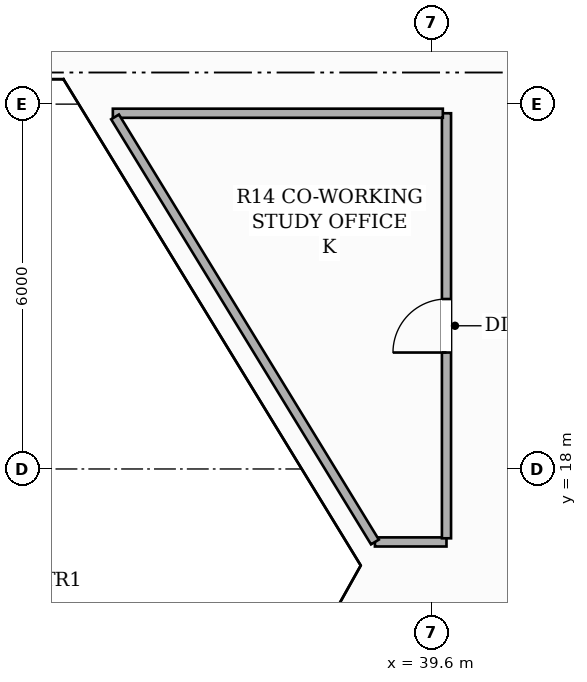
"""IFC4 building model, lengths in metres.
Left out: names, types, materials, properties, quantities, classifications, styles, units other than length and angle.
Written with IfcOpenShell. Run it as: python <this file> out.ifc"""

import sys

from ifc_helpers import new_model, si_unit, direction, frame, frame_2d, origin, place, context, subcontext, project, spatial, rectangle, extrude, element, fill, save


model = new_model("IFC4")
c1 = context("Model", 3, precision=1e-05, world=origin(), true_north=direction((0.0, 1.0)))
c2 = subcontext(c1, "Body", "Model", "MODEL_VIEW")
j1 = project(units=[si_unit("LENGTHUNIT", "METRE"), si_unit("PLANEANGLEUNIT", "RADIAN")], contexts=[c1])
p1 = place(None, origin())
s1 = spatial("IfcSite", under=j1, at=p1, CompositionType="ELEMENT")
p2 = place(p1, origin())
s2 = spatial("IfcBuilding", under=s1, at=p2, CompositionType="ELEMENT")
p3 = place(p2, frame((0.0, 0.0, 64.25)))
s3 = spatial("IfcBuildingStorey", under=s2, at=p3, CompositionType="ELEMENT", Elevation=64.25)
p4 = place(p3, frame((38.673, 16.8, 0.0), z_axis=(0.0, 0.0, 1.0), x_axis=(1.0, 0.0, 0.0)))
e1 = element("IfcWall", 1, at=p4, inside=s3, PredefinedType="PARTITIONING", context=c2, shape_type="SweptSolid", body=[
    extrude(rectangle(XDim=1.177, YDim=0.15, at=frame_2d((0.588, 0.0))), origin(), (0.0, 0.0, 1.0), 3.06),
])
p5 = place(p3, frame((39.85, 16.86, 0.0), z_axis=(0.0, 0.0, 1.0), x_axis=(0.0, 1.0, 0.0)))
e2 = element("IfcWall", 2, at=p5, inside=s3, PredefinedType="PARTITIONING", context=c2, shape_type="SweptSolid", body=[
    extrude(rectangle(XDim=6.99, YDim=0.15, at=frame_2d((3.495, 0.0))), origin(), (0.0, 0.0, 1.0), 2.669),
])
p6 = place(p5, frame((3.055, 0.0, 0.0)))
e3 = element("IfcOpeningElement", 3, at=p6, cuts=e2, PredefinedType="OPENING", context=c2, shape_type="SweptSolid", body=[
    extrude(rectangle(XDim=0.88, YDim=2.1, at=frame_2d((0.44, 1.05))), frame((0.0, 0.085, 0.0), z_axis=(0.0, -1.0, 0.0), x_axis=(1.0, 0.0, 0.0)), (0.0, 0.0, 1.0), 0.17),
])
p7 = place(p3, frame((39.79, 23.85, 0.0), z_axis=(0.0, 0.0, 1.0), x_axis=(-1.0, 0.0, 0.0)))
e4 = element("IfcWall", 4, at=p7, inside=s3, PredefinedType="PARTITIONING", context=c2, shape_type="SweptSolid", body=[
    extrude(rectangle(XDim=5.427, YDim=0.15, at=frame_2d((2.713, 0.0))), origin(), (0.0, 0.0, 1.0), 2.669),
])
p8 = place(p3, frame((34.399, 23.79, 0.0), z_axis=(0.0, 0.0, 1.0), x_axis=(0.521619930676, -0.853177969665, 0.0)))
e5 = element("IfcWall", 5, at=p8, inside=s3, PredefinedType="PARTITIONING", context=c2, shape_type="SweptSolid", body=[
    extrude(rectangle(XDim=8.194, YDim=0.15, at=frame_2d((4.097, 0.0))), origin(), (0.0, 0.0, 1.0), 2.669),
])
p9 = place(p6, origin())
e6 = element("IfcDoor", 6, at=p9, inside=s3, OperationType="SINGLE_SWING_LEFT", PredefinedType="DOOR", context=c2, shape_type="SweptSolid", body=[
    extrude(rectangle(XDim=0.88, YDim=2.1, at=frame_2d((0.44, 1.05))), frame((0.0, 0.025, 0.0), z_axis=(0.0, -1.0, 0.0), x_axis=(1.0, 0.0, 0.0)), (0.0, 0.0, 1.0), 0.05),
])
fill(e3, e6)
save(model, sys.argv[1])
